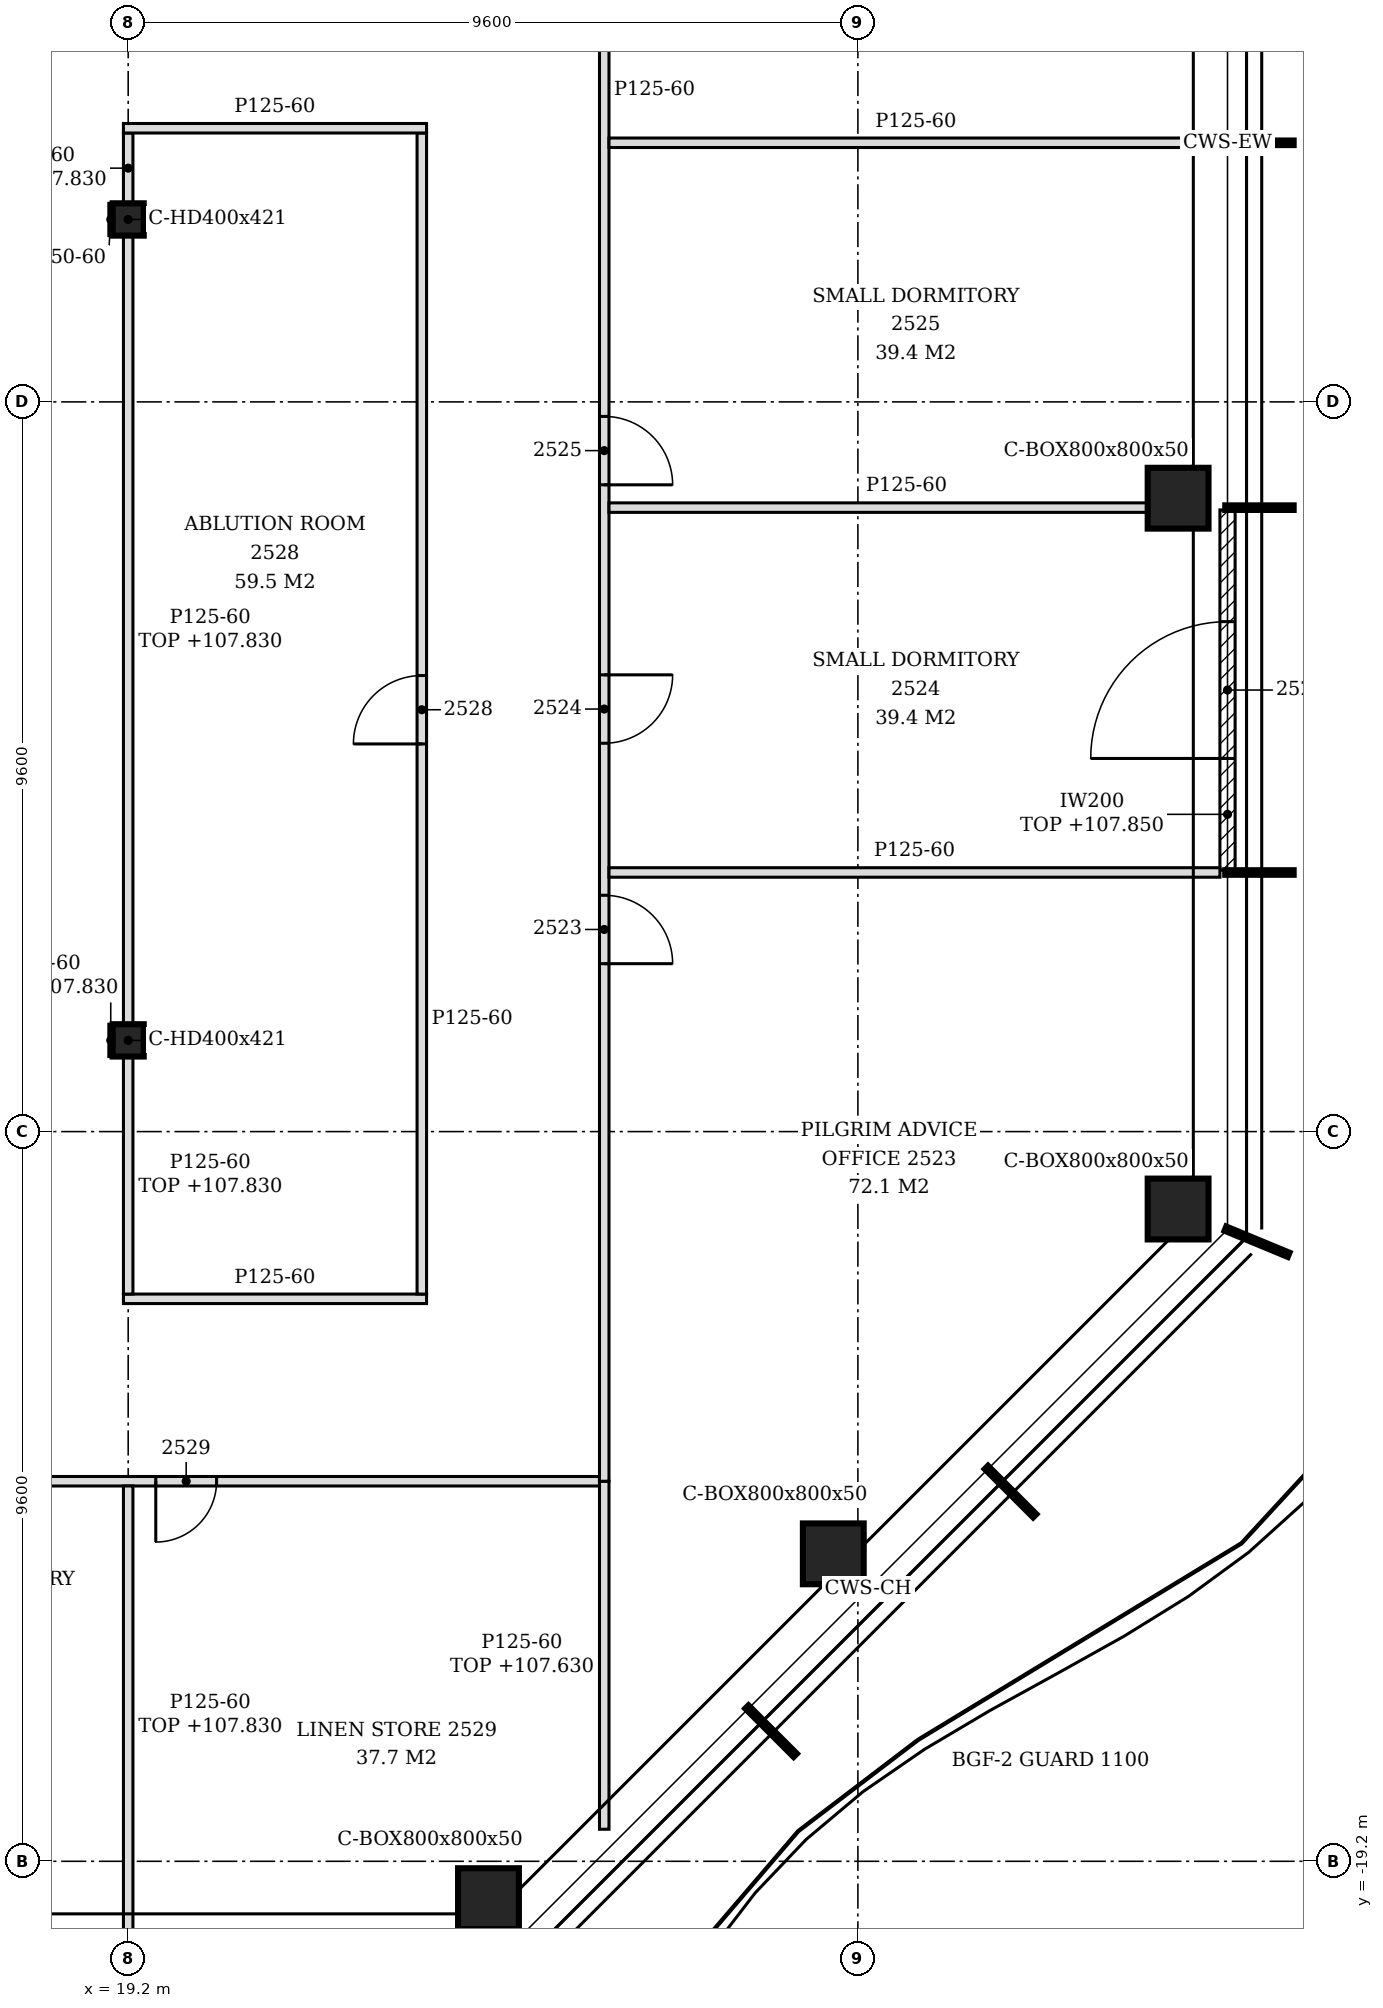
"""IFC4 building model, lengths in metres.
Left out: names, types, materials, properties, quantities, classifications, styles, units other than length and angle.
Written with IfcOpenShell. Run it as: python <this file> out.ifc"""

import sys

from ifc_helpers import new_model, si_unit, direction, frame, frame_2d, origin, origin_2d, place, context, subcontext, project, spatial, polyline, rectangle, hollow_rectangle, i_section, outline, extrude, clip, halfspace, element, fill, save


model = new_model("IFC4")
c1 = context("Model", 3, precision=1e-05, world=origin(), true_north=direction((0.0, 1.0)))
c2 = subcontext(c1, "Body", "Model", "MODEL_VIEW")
j1 = project(units=[si_unit("LENGTHUNIT", "METRE"), si_unit("PLANEANGLEUNIT", "RADIAN")], contexts=[c1])
p1 = place(None, origin())
s1 = spatial("IfcSite", under=j1, at=p1, CompositionType="ELEMENT")
p2 = place(p1, origin())
s2 = spatial("IfcBuilding", under=s1, at=p2, CompositionType="ELEMENT")
p3 = place(p2, frame((0.0, 0.0, 105.0)))
s3 = spatial("IfcBuildingStorey", under=s2, at=p3, CompositionType="ELEMENT", Elevation=105.0)
for number, where, z_axis, x_axis in (
    (1, (23.94, -19.691, -0.15), (0.282, 0.188, 0.941), (-0.555, 0.832, 0.0)),
    (2, (28.477, -15.155, -0.15), (0.282, 0.188, 0.941), (-0.555, 0.832, 0.0)),
    (3, (33.013, -10.619, -0.15), (0.282, 0.188, 0.941), (-0.555, 0.832, 0.0)),
    (4, (33.013, -1.267, -0.15), (0.282, 0.188, 0.941), (-0.555, 0.832, 0.0)),
):
    element("IfcColumn", number, at=place(p3, frame(where, z_axis=z_axis, x_axis=x_axis)), inside=s3, PredefinedType="COLUMN", context=c2, shape_type="Clipping", body=[
        clip(clip(extrude(hollow_rectangle(XDim=0.8, YDim=0.8, WallThickness=0.05, at=origin_2d()), origin(), (0.0, 0.0, 1.0), 3.826), halfspace(frame((0.0, 0.0, 0.024), z_axis=(0.0, 0.0, 1.0), x_axis=(1.0, 0.0, 0.0)), True)), halfspace(frame((0.0, 0.0, 3.802), z_axis=(0.0, 0.0, 1.0), x_axis=(1.0, 0.0, 0.0)), False)),
    ])
for number, where, z_axis, x_axis in (
    (5, (19.2, -8.4, -0.15), (0.0, 0.0, 1.0), (1.0, 0.0, 0.0)),
    (6, (19.2, 2.4, -0.15), (0.0, 0.0, 1.0), (1.0, 0.0, 0.0)),
):
    element("IfcColumn", number, at=place(p3, frame(where, z_axis=z_axis, x_axis=x_axis)), inside=s3, PredefinedType="COLUMN", context=c2, shape_type="SweptSolid", body=[
        extrude(i_section(OverallWidth=0.409, OverallDepth=0.425, WebThickness=0.033, FlangeThickness=0.052, FilletRadius=0.015, at=origin_2d()), origin(), (0.0, 0.0, 1.0), 3.6),
    ])
p4 = place(p3, frame((33.663, -6.161, 0.0), z_axis=(0.0, 0.0, 1.0), x_axis=(0.0, 1.0, 0.0)))
e7 = element("IfcWall", 7, at=p4, inside=s3, PredefinedType="NOTDEFINED", context=c2, shape_type="SweptSolid", body=[
    extrude(rectangle(XDim=4.74, YDim=0.2, at=frame_2d((2.37, 0.0))), origin(), (0.0, 0.0, 1.0), 2.85),
])
p5 = place(p4, frame((1.47, 0.0, 0.0)))
e8 = element("IfcOpeningElement", 8, at=p5, cuts=e7, PredefinedType="OPENING", context=c2, shape_type="SweptSolid", body=[
    extrude(rectangle(XDim=1.8, YDim=2.4, at=frame_2d((0.9, 1.2))), frame((0.0, 0.11, 0.0), z_axis=(0.0, -1.0, 0.0), x_axis=(1.0, 0.0, 0.0)), (0.0, 0.0, 1.0), 0.22),
])
p6 = place(p3, frame((19.2, -20.294, 0.0), z_axis=(0.0, 0.0, 1.0), x_axis=(0.0, 1.0, 0.0)))
e9 = element("IfcWall", 9, at=p6, inside=s3, PredefinedType="PARTITIONING", context=c2, shape_type="SweptSolid", body=[
    extrude(rectangle(XDim=6.032, YDim=0.125, at=frame_2d((3.016, 0.0))), origin(), (0.0, 0.0, 1.0), 2.83),
])
p7 = place(p3, frame((25.463, -18.778, 0.0), z_axis=(0.0, 0.0, 1.0), x_axis=(0.0, 1.0, 0.0)))
e10 = element("IfcWall", 10, at=p7, inside=s3, PredefinedType="PARTITIONING", context=c2, shape_type="SweptSolid", body=[
    extrude(outline(polyline([(0.0, 0.0), (4.578, 0.0), (4.578, 0.863), (4.578, 1.725), (4.578, 2.587), (4.578, 2.63), (0.0, 2.63), (0.0, 2.587), (0.0, 1.725), (0.0, 0.863), (0.0, 0.0)])), frame((0.0, 0.062, 0.0), z_axis=(0.0, -1.0, 0.0), x_axis=(1.0, 0.0, 0.0)), (0.0, 0.0, 1.0), 0.125),
])
p8 = place(p3, frame((-16.777, -14.2, 0.0), z_axis=(0.0, 0.0, 1.0), x_axis=(1.0, 0.0, 0.0)))
e11 = element("IfcWall", 11, at=p8, inside=s3, PredefinedType="PARTITIONING", context=c2, shape_type="SweptSolid", body=[
    extrude(outline(polyline([(0.0, 0.0), (42.177, 0.0), (42.177, 0.863), (42.177, 1.725), (42.177, 2.587), (42.177, 2.83), (0.0, 2.83), (0.0, 2.587), (0.0, 1.725), (0.0, 0.863), (0.0, 0.0)])), frame((0.0, 0.062, 0.0), z_axis=(0.0, -1.0, 0.0), x_axis=(1.0, 0.0, 0.0)), (0.0, 0.0, 1.0), 0.125),
])
p9 = place(p8, frame((6.39, 0.0, 0.0)))
e12 = element("IfcOpeningElement", 12, at=p9, cuts=e11, PredefinedType="OPENING", context=c2, shape_type="SweptSolid", body=[
    extrude(rectangle(XDim=0.8, YDim=2.1, at=frame_2d((0.4, 1.05))), frame((0.0, 0.073, 0.0), z_axis=(0.0, -1.0, 0.0), x_axis=(1.0, 0.0, 0.0)), (0.0, 0.0, 1.0), 0.145),
])
p10 = place(p8, frame((11.816, 0.0, 0.0)))
e13 = element("IfcOpeningElement", 13, at=p10, cuts=e11, PredefinedType="OPENING", context=c2, shape_type="SweptSolid", body=[
    extrude(rectangle(XDim=0.9, YDim=2.1, at=frame_2d((0.45, 1.05))), frame((0.0, 0.073, 0.0), z_axis=(0.0, -1.0, 0.0), x_axis=(1.0, 0.0, 0.0)), (0.0, 0.0, 1.0), 0.145),
])
p11 = place(p8, frame((15.89, 0.0, 0.0)))
e14 = element("IfcOpeningElement", 14, at=p11, cuts=e11, PredefinedType="OPENING", context=c2, shape_type="SweptSolid", body=[
    extrude(rectangle(XDim=0.9, YDim=2.1, at=frame_2d((0.45, 1.05))), frame((0.0, 0.073, 0.0), z_axis=(0.0, -1.0, 0.0), x_axis=(1.0, 0.0, 0.0)), (0.0, 0.0, 1.0), 0.145),
])
p12 = place(p8, frame((21.229, 0.0, 0.0)))
e15 = element("IfcOpeningElement", 15, at=p12, cuts=e11, PredefinedType="OPENING", context=c2, shape_type="SweptSolid", body=[
    extrude(rectangle(XDim=0.9, YDim=2.1, at=frame_2d((0.45, 1.05))), frame((0.0, 0.073, 0.0), z_axis=(0.0, -1.0, 0.0), x_axis=(1.0, 0.0, 0.0)), (0.0, 0.0, 1.0), 0.145),
])
p13 = place(p8, frame((25.49, 0.0, 0.0)))
e16 = element("IfcOpeningElement", 16, at=p13, cuts=e11, PredefinedType="OPENING", context=c2, shape_type="SweptSolid", body=[
    extrude(rectangle(XDim=0.9, YDim=2.1, at=frame_2d((0.45, 1.05))), frame((0.0, 0.073, 0.0), z_axis=(0.0, -1.0, 0.0), x_axis=(1.0, 0.0, 0.0)), (0.0, 0.0, 1.0), 0.145),
])
p14 = place(p8, frame((27.042, 0.0, 0.0)))
e17 = element("IfcOpeningElement", 17, at=p14, cuts=e11, PredefinedType="OPENING", context=c2, shape_type="SweptSolid", body=[
    extrude(rectangle(XDim=0.9, YDim=2.1, at=frame_2d((0.45, 1.05))), frame((0.0, 0.073, 0.0), z_axis=(0.0, -1.0, 0.0), x_axis=(1.0, 0.0, 0.0)), (0.0, 0.0, 1.0), 0.145),
])
p15 = place(p8, frame((33.977, 0.0, 0.0)))
e18 = element("IfcOpeningElement", 18, at=p15, cuts=e11, PredefinedType="OPENING", context=c2, shape_type="SweptSolid", body=[
    extrude(rectangle(XDim=0.9, YDim=2.1, at=frame_2d((0.45, 1.05))), frame((0.0, 0.073, 0.0), z_axis=(0.0, -1.0, 0.0), x_axis=(1.0, 0.0, 0.0)), (0.0, 0.0, 1.0), 0.145),
])
p16 = place(p8, frame((36.34, 0.0, 0.0)))
e19 = element("IfcOpeningElement", 19, at=p16, cuts=e11, PredefinedType="OPENING", context=c2, shape_type="SweptSolid", body=[
    extrude(rectangle(XDim=0.8, YDim=2.1, at=frame_2d((0.4, 1.05))), frame((0.0, 0.073, 0.0), z_axis=(0.0, -1.0, 0.0), x_axis=(1.0, 0.0, 0.0)), (0.0, 0.0, 1.0), 0.145),
])
p17 = place(p3, frame((25.463, -14.2, 0.0), z_axis=(0.0, 0.0, 1.0), x_axis=(0.0, 1.0, 0.0)))
e20 = element("IfcWall", 20, at=p17, inside=s3, PredefinedType="PARTITIONING", context=c2, shape_type="SweptSolid", body=[
    extrude(outline(polyline([(0.0, 0.0), (27.4, 0.0), (27.4, 3.45), (23.238, 3.45), (23.236, 2.83), (23.018, 2.83), (23.016, 3.45), (18.438, 3.45), (18.436, 2.83), (18.218, 2.83), (18.216, 3.45), (13.638, 3.45), (13.636, 2.83), (13.418, 2.83), (13.416, 3.45), (8.838, 3.45), (8.836, 2.83), (8.618, 2.83), (8.616, 3.45), (4.038, 3.45), (4.036, 2.83), (3.818, 2.83), (3.816, 3.45), (0.0, 3.45), (0.0, 0.0)])), frame((0.0, 0.062, 0.0), z_axis=(0.0, -1.0, 0.0), x_axis=(1.0, 0.0, 0.0)), (0.0, 0.0, 1.0), 0.125),
])
p18 = place(p17, frame((6.809, 0.0, 0.0)))
e21 = element("IfcOpeningElement", 21, at=p18, cuts=e20, PredefinedType="OPENING", context=c2, shape_type="SweptSolid", body=[
    extrude(rectangle(XDim=0.9, YDim=2.1, at=frame_2d((0.45, 1.05))), frame((0.0, 0.073, 0.0), z_axis=(0.0, -1.0, 0.0), x_axis=(1.0, 0.0, 0.0)), (0.0, 0.0, 1.0), 0.145),
])
p19 = place(p17, frame((9.709, 0.0, 0.0)))
e22 = element("IfcOpeningElement", 22, at=p19, cuts=e20, PredefinedType="OPENING", context=c2, shape_type="SweptSolid", body=[
    extrude(rectangle(XDim=0.9, YDim=2.1, at=frame_2d((0.45, 1.05))), frame((0.0, 0.073, 0.0), z_axis=(0.0, -1.0, 0.0), x_axis=(1.0, 0.0, 0.0)), (0.0, 0.0, 1.0), 0.145),
])
p20 = place(p17, frame((13.109, 0.0, 0.0)))
e23 = element("IfcOpeningElement", 23, at=p20, cuts=e20, PredefinedType="OPENING", context=c2, shape_type="SweptSolid", body=[
    extrude(rectangle(XDim=0.9, YDim=2.1, at=frame_2d((0.45, 1.05))), frame((0.0, 0.073, 0.0), z_axis=(0.0, -1.0, 0.0), x_axis=(1.0, 0.0, 0.0)), (0.0, 0.0, 1.0), 0.145),
])
p21 = place(p17, frame((22.6, 0.0, 0.0)))
e24 = element("IfcOpeningElement", 24, at=p21, cuts=e20, PredefinedType="OPENING", context=c2, shape_type="SweptSolid", body=[
    extrude(rectangle(XDim=0.9, YDim=2.1, at=frame_2d((0.45, 1.05))), frame((0.0, 0.073, 0.0), z_axis=(0.0, -1.0, 0.0), x_axis=(1.0, 0.0, 0.0)), (0.0, 0.0, 1.0), 0.145),
])
p22 = place(p3, frame((19.137, -11.8, 0.0), z_axis=(0.0, 0.0, 1.0), x_axis=(1.0, 0.0, 0.0)))
e25 = element("IfcWall", 25, at=p22, inside=s3, PredefinedType="PARTITIONING", context=c2, shape_type="SweptSolid", body=[
    extrude(outline(polyline([(0.0, 0.0), (3.988, 0.0), (3.988, 3.45), (0.212, 3.45), (0.21, 2.83), (0.0, 2.83), (0.0, 0.0)])), frame((0.0, 0.062, 0.0), z_axis=(0.0, -1.0, 0.0), x_axis=(1.0, 0.0, 0.0)), (0.0, 0.0, 1.0), 0.125),
])
p23 = place(p3, frame((19.2, -11.738, 0.0), z_axis=(0.0, 0.0, 1.0), x_axis=(0.0, 1.0, 0.0)))
e26 = element("IfcWall", 26, at=p23, inside=s3, PredefinedType="PARTITIONING", context=c2, shape_type="SweptSolid", body=[
    extrude(rectangle(XDim=3.125, YDim=0.125, at=frame_2d((1.562, 0.0))), origin(), (0.0, 0.0, 1.0), 2.83),
])
p24 = place(p3, frame((23.063, -11.738, 0.0), z_axis=(0.0, 0.0, 1.0), x_axis=(0.0, 1.0, 0.0)))
e27 = element("IfcWall", 27, at=p24, inside=s3, PredefinedType="PARTITIONING", context=c2, shape_type="SweptSolid", body=[
    extrude(outline(polyline([(0.0, 0.0), (15.275, 0.0), (15.275, 3.45), (11.175, 3.45), (11.173, 2.83), (10.955, 2.83), (10.953, 3.45), (6.375, 3.45), (6.373, 2.83), (6.155, 2.83), (6.153, 3.45), (1.575, 3.45), (1.573, 2.83), (1.355, 2.83), (1.353, 3.45), (0.0, 3.45), (0.0, 0.0)])), frame((0.0, 0.062, 0.0), z_axis=(0.0, -1.0, 0.0), x_axis=(1.0, 0.0, 0.0)), (0.0, 0.0, 1.0), 0.125),
])
p25 = place(p24, frame((7.238, 0.0, 0.0)))
e28 = element("IfcOpeningElement", 28, at=p25, cuts=e27, PredefinedType="OPENING", context=c2, shape_type="SweptSolid", body=[
    extrude(rectangle(XDim=0.9, YDim=2.1, at=frame_2d((0.45, 1.05))), frame((0.0, 0.073, 0.0), z_axis=(0.0, -1.0, 0.0), x_axis=(1.0, 0.0, 0.0)), (0.0, 0.0, 1.0), 0.145),
])
p26 = place(p3, frame((19.2, -8.188, 0.0), z_axis=(0.0, 0.0, 1.0), x_axis=(0.0, 1.0, 0.0)))
e29 = element("IfcWall", 29, at=p26, inside=s3, PredefinedType="PARTITIONING", context=c2, shape_type="SweptSolid", body=[
    extrude(rectangle(XDim=10.375, YDim=0.125, at=frame_2d((5.188, 0.0))), origin(), (0.0, 0.0, 1.0), 2.83),
])
p27 = place(p3, frame((25.525, -6.191, 0.0), z_axis=(0.0, 0.0, 1.0), x_axis=(1.0, 0.0, 0.0)))
e30 = element("IfcWall", 30, at=p27, inside=s3, PredefinedType="PARTITIONING", context=c2, shape_type="SweptSolid", body=[
    extrude(rectangle(XDim=8.038, YDim=0.125, at=frame_2d((4.019, 0.0))), origin(), (0.0, 0.0, 1.0), 3.45),
])
p28 = place(p3, frame((25.525, -1.391, 0.0), z_axis=(0.0, 0.0, 1.0), x_axis=(1.0, 0.0, 0.0)))
e31 = element("IfcWall", 31, at=p28, inside=s3, PredefinedType="PARTITIONING", context=c2, shape_type="SweptSolid", body=[
    extrude(outline(polyline([(0.0, 0.0), (7.082, 0.0), (7.456, 0.863), (7.829, 1.725), (7.829, 2.587), (7.829, 3.45), (0.0, 3.45), (0.0, 2.587), (0.0, 1.725), (0.0, 0.863), (0.0, 0.0)])), frame((0.0, 0.062, 0.0), z_axis=(0.0, -1.0, 0.0), x_axis=(1.0, 0.0, 0.0)), (0.0, 0.0, 1.0), 0.125),
])
p29 = place(p3, frame((19.2, 2.613, 0.0), z_axis=(0.0, 0.0, 1.0), x_axis=(0.0, 1.0, 0.0)))
e32 = element("IfcWall", 32, at=p29, inside=s3, PredefinedType="PARTITIONING", context=c2, shape_type="SweptSolid", body=[
    extrude(rectangle(XDim=0.925, YDim=0.125, at=frame_2d((0.462, 0.0))), origin(), (0.0, 0.0, 1.0), 2.83),
])
p30 = place(p3, frame((25.525, 3.409, 0.0), z_axis=(0.0, 0.0, 1.0), x_axis=(1.0, 0.0, 0.0)))
e33 = element("IfcWall", 33, at=p30, inside=s3, PredefinedType="PARTITIONING", context=c2, shape_type="SweptSolid", body=[
    extrude(rectangle(XDim=8.077, YDim=0.125, at=frame_2d((4.039, 0.0))), origin(), (0.0, 0.0, 1.0), 3.45),
])
p31 = place(p3, frame((19.137, 3.6, 0.0), z_axis=(0.0, 0.0, 1.0), x_axis=(1.0, 0.0, 0.0)))
e34 = element("IfcWall", 34, at=p31, inside=s3, PredefinedType="PARTITIONING", context=c2, shape_type="SweptSolid", body=[
    extrude(outline(polyline([(0.0, 0.0), (3.988, 0.0), (3.988, 3.45), (0.212, 3.45), (0.21, 2.83), (0.0, 2.83), (0.0, 0.0)])), frame((0.0, 0.062, 0.0), z_axis=(0.0, -1.0, 0.0), x_axis=(1.0, 0.0, 0.0)), (0.0, 0.0, 1.0), 0.125),
])
p32 = place(p3, frame((18.97, -8.613, 0.0), z_axis=(0.0, 0.0, 1.0), x_axis=(0.0, 1.0, 0.0)))
e35 = element("IfcWall", 35, at=p32, inside=s3, PredefinedType="PARTITIONING", context=c2, shape_type="SweptSolid", body=[
    extrude(rectangle(XDim=0.425, YDim=0.05, at=frame_2d((0.212, 0.0))), origin(), (0.0, 0.0, 1.0), 2.83),
])
p33 = place(p3, frame((18.97, 2.188, 0.0), z_axis=(0.0, 0.0, 1.0), x_axis=(0.0, 1.0, 0.0)))
e36 = element("IfcWall", 36, at=p33, inside=s3, PredefinedType="PARTITIONING", context=c2, shape_type="SweptSolid", body=[
    extrude(rectangle(XDim=0.425, YDim=0.05, at=frame_2d((0.212, 0.0))), origin(), (0.0, 0.0, 1.0), 3.45),
])
p34 = place(p5, origin())
e37 = element("IfcDoor", 37, at=p34, inside=s3, OperationType="SINGLE_SWING_LEFT", PredefinedType="DOOR", context=c2, shape_type="SweptSolid", body=[
    extrude(rectangle(XDim=1.8, YDim=2.4, at=frame_2d((0.9, 1.2))), frame((0.0, 0.025, 0.0), z_axis=(0.0, -1.0, 0.0), x_axis=(1.0, 0.0, 0.0)), (0.0, 0.0, 1.0), 0.05),
])
fill(e8, e37)
p35 = place(p18, frame((0.9, 0.0, 0.0), z_axis=(0.0, 0.0, 1.0), x_axis=(-1.0, 0.0, 0.0)))
e38 = element("IfcDoor", 38, at=p35, inside=s3, OperationType="SINGLE_SWING_RIGHT", PredefinedType="DOOR", context=c2, shape_type="SweptSolid", body=[
    extrude(rectangle(XDim=0.9, YDim=2.1, at=frame_2d((0.45, 1.05))), frame((0.0, 0.025, 0.0), z_axis=(0.0, -1.0, 0.0), x_axis=(1.0, 0.0, 0.0)), (0.0, 0.0, 1.0), 0.05),
])
fill(e21, e38)
p36 = place(p19, frame((0.9, 0.0, 0.0), z_axis=(0.0, 0.0, 1.0), x_axis=(-1.0, 0.0, 0.0)))
e39 = element("IfcDoor", 39, at=p36, inside=s3, OperationType="SINGLE_SWING_LEFT", PredefinedType="DOOR", context=c2, shape_type="SweptSolid", body=[
    extrude(rectangle(XDim=0.9, YDim=2.1, at=frame_2d((0.45, 1.05))), frame((0.0, 0.025, 0.0), z_axis=(0.0, -1.0, 0.0), x_axis=(1.0, 0.0, 0.0)), (0.0, 0.0, 1.0), 0.05),
])
fill(e22, e39)
p37 = place(p20, frame((0.9, 0.0, 0.0), z_axis=(0.0, 0.0, 1.0), x_axis=(-1.0, 0.0, 0.0)))
e40 = element("IfcDoor", 40, at=p37, inside=s3, OperationType="SINGLE_SWING_RIGHT", PredefinedType="DOOR", context=c2, shape_type="SweptSolid", body=[
    extrude(rectangle(XDim=0.9, YDim=2.1, at=frame_2d((0.45, 1.05))), frame((0.0, 0.025, 0.0), z_axis=(0.0, -1.0, 0.0), x_axis=(1.0, 0.0, 0.0)), (0.0, 0.0, 1.0), 0.05),
])
fill(e23, e40)
p38 = place(p25, origin())
e41 = element("IfcDoor", 41, at=p38, inside=s3, OperationType="SINGLE_SWING_LEFT", PredefinedType="DOOR", context=c2, shape_type="SweptSolid", body=[
    extrude(rectangle(XDim=0.9, YDim=2.1, at=frame_2d((0.45, 1.05))), frame((0.0, 0.025, 0.0), z_axis=(0.0, -1.0, 0.0), x_axis=(1.0, 0.0, 0.0)), (0.0, 0.0, 1.0), 0.05),
])
fill(e28, e41)
p39 = place(p16, frame((0.8, 0.0, 0.0), z_axis=(0.0, 0.0, 1.0), x_axis=(-1.0, 0.0, 0.0)))
e42 = element("IfcDoor", 42, at=p39, inside=s3, OperationType="SINGLE_SWING_RIGHT", PredefinedType="DOOR", context=c2, shape_type="SweptSolid", body=[
    extrude(rectangle(XDim=0.8, YDim=2.1, at=frame_2d((0.4, 1.05))), frame((0.0, 0.025, 0.0), z_axis=(0.0, -1.0, 0.0), x_axis=(1.0, 0.0, 0.0)), (0.0, 0.0, 1.0), 0.05),
])
fill(e19, e42)
save(model, sys.argv[1])
